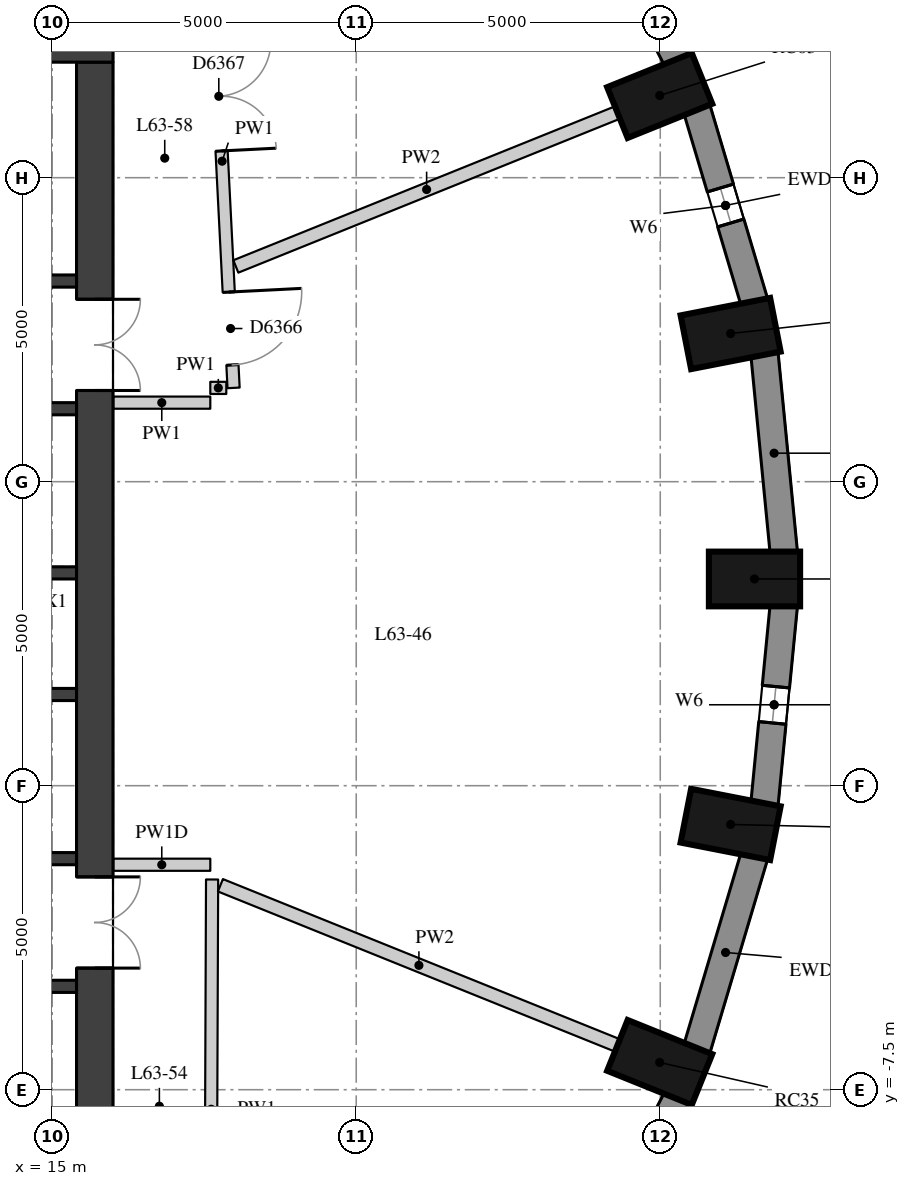
"""IFC4 building model, lengths in metres.
Left out: names, types, materials, properties, quantities, classifications, styles, units other than length and angle.
Written with IfcOpenShell. Run it as: python <this file> out.ifc"""

import sys

from ifc_helpers import new_model, si_unit, direction, frame, frame_2d, origin, origin_2d, place, context, subcontext, project, spatial, rectangle, extrude, element, fill, save


model = new_model("IFC4")
c1 = context("Model", 3, precision=1e-05, world=origin(), true_north=direction((0.0, 1.0)))
c2 = subcontext(c1, "Body", "Model", "MODEL_VIEW")
j1 = project(units=[si_unit("LENGTHUNIT", "METRE"), si_unit("PLANEANGLEUNIT", "RADIAN")], contexts=[c1])
p1 = place(None, origin())
s1 = spatial("IfcSite", under=j1, at=p1, CompositionType="ELEMENT")
p2 = place(p1, origin())
s2 = spatial("IfcBuilding", under=s1, at=p2, CompositionType="ELEMENT")
p3 = place(p2, frame((0.0, 0.0, 222.2)))
s3 = spatial("IfcBuildingStorey", under=s2, at=p3, CompositionType="ELEMENT", Elevation=222.2)
for number, where, z_axis, x_axis in (
    (1, (26.55, 0.9, 0.0), (0.0, 0.0, 1.0), (1.0, 0.0, 0.0)),
    (2, (26.157, 4.937, 0.0), (0.0, 0.0, 1.0), (0.981, 0.192, 0.0)),
    (3, (24.991, 8.852, 0.0), (0.0, 0.0, 1.0), (0.927, 0.374, 0.0)),
    (4, (24.991, -7.052, 0.0), (0.0, 0.0, 1.0), (0.927, -0.374, 0.0)),
    (5, (26.157, -3.137, 0.0), (0.0, 0.0, 1.0), (0.981, -0.192, 0.0)),
):
    element("IfcColumn", number, at=place(p3, frame(where, z_axis=z_axis, x_axis=x_axis)), inside=s3, PredefinedType="COLUMN", context=c2, shape_type="SweptSolid", body=[
        extrude(rectangle(XDim=1.5, YDim=0.9, at=origin_2d()), origin(), (0.0, 0.0, 1.0), 3.3),
    ])
p4 = place(p3, frame((27.032, 1.33, 0.0), z_axis=(0.0, 0.0, 1.0), x_axis=(-0.096824116835, 0.995301507283, 0.0)))
e6 = element("IfcWall", 6, at=p4, inside=s3, PredefinedType="SOLIDWALL", context=c2, shape_type="SweptSolid", body=[
    extrude(rectangle(XDim=3.293, YDim=0.45, at=frame_2d((1.646, 0.0))), origin(), (0.0, 0.0, 1.0), 3.02),
])
p5 = place(p3, frame((26.548, 5.452, 0.0), z_axis=(0.0, 0.0, 1.0), x_axis=(-0.285444972963, 0.958395099847, 0.0)))
e7 = element("IfcWall", 7, at=p5, inside=s3, PredefinedType="SOLIDWALL", context=c2, shape_type="SweptSolid", body=[
    extrude(rectangle(XDim=3.32, YDim=0.45, at=frame_2d((1.66, 0.0))), origin(), (0.0, 0.0, 1.0), 3.02),
])
p6 = place(p5, frame((1.36, 0.0, 0.4)))
e8 = element("IfcOpeningElement", 8, at=p6, cuts=e7, PredefinedType="OPENING", context=c2, shape_type="SweptSolid", body=[
    extrude(rectangle(XDim=0.6, YDim=1.75, at=frame_2d((0.3, 0.875))), frame((0.0, 0.235, 0.0), z_axis=(0.0, -1.0, 0.0), x_axis=(1.0, 0.0, 0.0)), (0.0, 0.0, 1.0), 0.47),
])
p7 = place(p3, frame((25.278, 9.432, 0.0), z_axis=(0.0, 0.0, 1.0), x_axis=(-0.460175500475, 0.887827972505, 0.0)))
e9 = element("IfcWall", 9, at=p7, inside=s3, PredefinedType="SOLIDWALL", context=c2, shape_type="SweptSolid", body=[
    extrude(rectangle(XDim=3.371, YDim=0.45, at=frame_2d((1.685, 0.0))), origin(), (0.0, 0.0, 1.0), 3.02),
])
p8 = place(p3, frame((23.727, -10.624, 0.0), z_axis=(0.0, 0.0, 1.0), x_axis=(0.460175500475, 0.887827972505, 0.0)))
e10 = element("IfcWall", 10, at=p8, inside=s3, PredefinedType="SOLIDWALL", context=c2, shape_type="SweptSolid", body=[
    extrude(rectangle(XDim=3.371, YDim=0.45, at=frame_2d((1.685, 0.0))), origin(), (0.0, 0.0, 1.0), 3.02),
])
p9 = place(p8, frame((1.385, 0.0, 0.4)))
e11 = element("IfcOpeningElement", 11, at=p9, cuts=e10, PredefinedType="OPENING", context=c2, shape_type="SweptSolid", body=[
    extrude(rectangle(XDim=0.6, YDim=1.75, at=frame_2d((0.3, 0.875))), frame((0.0, 0.235, 0.0), z_axis=(0.0, -1.0, 0.0), x_axis=(1.0, 0.0, 0.0)), (0.0, 0.0, 1.0), 0.47),
])
p10 = place(p3, frame((25.6, -6.834, 0.0), z_axis=(0.0, 0.0, 1.0), x_axis=(0.285444972963, 0.958395099847, 0.0)))
e12 = element("IfcWall", 12, at=p10, inside=s3, PredefinedType="SOLIDWALL", context=c2, shape_type="SweptSolid", body=[
    extrude(rectangle(XDim=3.32, YDim=0.45, at=frame_2d((1.66, 0.0))), origin(), (0.0, 0.0, 1.0), 3.02),
])
p11 = place(p3, frame((26.713, -2.808, 0.0), z_axis=(0.0, 0.0, 1.0), x_axis=(0.096816972749, 0.995302202242, 0.0)))
e13 = element("IfcWall", 13, at=p11, inside=s3, PredefinedType="SOLIDWALL", context=c2, shape_type="SweptSolid", body=[
    extrude(rectangle(XDim=3.293, YDim=0.45, at=frame_2d((1.646, 0.0))), origin(), (0.0, 0.0, 1.0), 3.02),
])
p12 = place(p11, frame((1.347, 0.0, 0.4)))
e14 = element("IfcOpeningElement", 14, at=p12, cuts=e13, PredefinedType="OPENING", context=c2, shape_type="SweptSolid", body=[
    extrude(rectangle(XDim=0.6, YDim=1.75, at=frame_2d((0.3, 0.875))), frame((0.0, 0.235, 0.0), z_axis=(0.0, -1.0, 0.0), x_axis=(1.0, 0.0, 0.0)), (0.0, 0.0, 1.0), 0.47),
])
p13 = place(p3, frame((15.7, -9.4, 0.0), z_axis=(0.0, 0.0, 1.0), x_axis=(0.0, 1.0, 0.0)))
e15 = element("IfcWall", 15, at=p13, inside=s3, PredefinedType="SHEAR", context=c2, shape_type="SweptSolid", body=[
    extrude(rectangle(XDim=18.8, YDim=0.6, at=frame_2d((9.4, 0.0))), origin(), (0.0, 0.0, 1.0), 3.02),
])
p14 = place(p13, frame((13.4, 0.0, 0.0)))
e16 = element("IfcOpeningElement", 16, at=p14, cuts=e15, PredefinedType="OPENING", context=c2, shape_type="SweptSolid", body=[
    extrude(rectangle(XDim=1.5, YDim=2.1, at=frame_2d((0.75, 1.05))), frame((0.0, 0.31, 0.0), z_axis=(0.0, -1.0, 0.0), x_axis=(1.0, 0.0, 0.0)), (0.0, 0.0, 1.0), 0.62),
])
p15 = place(p13, frame((3.9, 0.0, 0.0)))
e17 = element("IfcOpeningElement", 17, at=p15, cuts=e15, PredefinedType="OPENING", context=c2, shape_type="SweptSolid", body=[
    extrude(rectangle(XDim=1.5, YDim=2.1, at=frame_2d((0.75, 1.05))), frame((0.0, 0.31, 0.0), z_axis=(0.0, -1.0, 0.0), x_axis=(1.0, 0.0, 0.0)), (0.0, 0.0, 1.0), 0.62),
])
p16 = place(p3, frame((4.0, 9.7, 0.0), z_axis=(0.0, 0.0, 1.0), x_axis=(1.0, 0.0, 0.0)))
e18 = element("IfcWall", 18, at=p16, inside=s3, PredefinedType="SHEAR", context=c2, shape_type="SweptSolid", body=[
    extrude(rectangle(XDim=12.0, YDim=0.6, at=frame_2d((6.0, 0.0))), origin(), (0.0, 0.0, 1.0), 3.02),
])
p17 = place(p3, frame((4.6, 5.8, 0.0), z_axis=(0.0, 0.0, 1.0), x_axis=(1.0, 0.0, 0.0)))
e19 = element("IfcWall", 19, at=p17, inside=s3, PredefinedType="SHEAR", context=c2, shape_type="SweptSolid", body=[
    extrude(rectangle(XDim=10.8, YDim=0.2, at=frame_2d((5.4, 0.0))), origin(), (0.0, 0.0, 1.0), 3.02),
])
p18 = place(p17, frame((7.05, 0.0, 0.0)))
e20 = element("IfcOpeningElement", 20, at=p18, cuts=e19, PredefinedType="OPENING", context=c2, shape_type="SweptSolid", body=[
    extrude(rectangle(XDim=1.1, YDim=2.1, at=frame_2d((0.55, 1.05))), frame((0.0, 0.11, 0.0), z_axis=(0.0, -1.0, 0.0), x_axis=(1.0, 0.0, 0.0)), (0.0, 0.0, 1.0), 0.22),
])
p19 = place(p17, frame((9.05, 0.0, 0.0)))
e21 = element("IfcOpeningElement", 21, at=p19, cuts=e19, PredefinedType="OPENING", context=c2, shape_type="SweptSolid", body=[
    extrude(rectangle(XDim=1.1, YDim=2.1, at=frame_2d((0.55, 1.05))), frame((0.0, 0.11, 0.0), z_axis=(0.0, -1.0, 0.0), x_axis=(1.0, 0.0, 0.0)), (0.0, 0.0, 1.0), 0.22),
])
p20 = place(p3, frame((4.6, 3.7, 0.0), z_axis=(0.0, 0.0, 1.0), x_axis=(1.0, 0.0, 0.0)))
e22 = element("IfcWall", 22, at=p20, inside=s3, PredefinedType="SHEAR", context=c2, shape_type="SweptSolid", body=[
    extrude(rectangle(XDim=10.8, YDim=0.2, at=frame_2d((5.4, 0.0))), origin(), (0.0, 0.0, 1.0), 3.02),
])
p21 = place(p20, frame((6.6, 0.0, 0.0)))
e23 = element("IfcOpeningElement", 23, at=p21, cuts=e22, PredefinedType="OPENING", context=c2, shape_type="SweptSolid", body=[
    extrude(rectangle(XDim=1.1, YDim=2.1, at=frame_2d((0.55, 1.05))), frame((0.0, 0.11, 0.0), z_axis=(0.0, -1.0, 0.0), x_axis=(1.0, 0.0, 0.0)), (0.0, 0.0, 1.0), 0.22),
])
p22 = place(p20, frame((8.9, 0.0, 0.0)))
e24 = element("IfcOpeningElement", 24, at=p22, cuts=e22, PredefinedType="OPENING", context=c2, shape_type="SweptSolid", body=[
    extrude(rectangle(XDim=1.1, YDim=2.1, at=frame_2d((0.55, 1.05))), frame((0.0, 0.11, 0.0), z_axis=(0.0, -1.0, 0.0), x_axis=(1.0, 0.0, 0.0)), (0.0, 0.0, 1.0), 0.22),
])
for number, where, z_axis, x_axis in (
    (25, (4.6, 1.0, 0.0), (0.0, 0.0, 1.0), (1.0, 0.0, 0.0)),
    (26, (4.6, -1.0, 0.0), (0.0, 0.0, 1.0), (1.0, 0.0, 0.0)),
):
    element("IfcWall", number, at=place(p3, frame(where, z_axis=z_axis, x_axis=x_axis)), inside=s3, PredefinedType="SHEAR", context=c2, shape_type="SweptSolid", body=[
        extrude(rectangle(XDim=10.8, YDim=0.2, at=frame_2d((5.4, 0.0))), origin(), (0.0, 0.0, 1.0), 3.02),
    ])
p23 = place(p3, frame((4.6, -3.7, 0.0), z_axis=(0.0, 0.0, 1.0), x_axis=(1.0, 0.0, 0.0)))
e27 = element("IfcWall", 27, at=p23, inside=s3, PredefinedType="SHEAR", context=c2, shape_type="SweptSolid", body=[
    extrude(rectangle(XDim=10.8, YDim=0.2, at=frame_2d((5.4, 0.0))), origin(), (0.0, 0.0, 1.0), 3.02),
])
p24 = place(p23, frame((6.6, 0.0, 0.0)))
e28 = element("IfcOpeningElement", 28, at=p24, cuts=e27, PredefinedType="OPENING", context=c2, shape_type="SweptSolid", body=[
    extrude(rectangle(XDim=1.1, YDim=2.1, at=frame_2d((0.55, 1.05))), frame((0.0, 0.11, 0.0), z_axis=(0.0, -1.0, 0.0), x_axis=(1.0, 0.0, 0.0)), (0.0, 0.0, 1.0), 0.22),
])
p25 = place(p23, frame((8.9, 0.0, 0.0)))
e29 = element("IfcOpeningElement", 29, at=p25, cuts=e27, PredefinedType="OPENING", context=c2, shape_type="SweptSolid", body=[
    extrude(rectangle(XDim=1.1, YDim=2.1, at=frame_2d((0.55, 1.05))), frame((0.0, 0.11, 0.0), z_axis=(0.0, -1.0, 0.0), x_axis=(1.0, 0.0, 0.0)), (0.0, 0.0, 1.0), 0.22),
])
p26 = place(p3, frame((4.6, -5.8, 0.0), z_axis=(0.0, 0.0, 1.0), x_axis=(1.0, 0.0, 0.0)))
e30 = element("IfcWall", 30, at=p26, inside=s3, PredefinedType="SHEAR", context=c2, shape_type="SweptSolid", body=[
    extrude(rectangle(XDim=10.8, YDim=0.2, at=frame_2d((5.4, 0.0))), origin(), (0.0, 0.0, 1.0), 3.02),
])
p27 = place(p3, frame((17.63, -4.043, 0.0), z_axis=(0.0, 0.0, 1.0), x_axis=(-0.003908870153, -0.999992360338, 0.0)))
e31 = element("IfcWall", 31, at=p27, inside=s3, PredefinedType="PARTITIONING", context=c2, shape_type="SweptSolid", body=[
    extrude(rectangle(XDim=7.557, YDim=0.2, at=frame_2d((3.779, 0.0))), origin(), (0.0, 0.0, 1.0), 3.02),
])
p28 = place(p3, frame((17.605, 11.5, 0.0), z_axis=(0.0, 0.0, 1.0), x_axis=(0.050646981223, -0.998716618112, 0.0)))
e32 = element("IfcWall", 32, at=p28, inside=s3, PredefinedType="PARTITIONING", context=c2, shape_type="SweptSolid", body=[
    extrude(rectangle(XDim=7.467, YDim=0.2, at=frame_2d((3.733, 0.0))), origin(), (0.0, 0.0, 1.0), 3.02),
])
p29 = place(p28, frame((5.889, 0.0, 0.0)))
e33 = element("IfcOpeningElement", 33, at=p29, cuts=e32, PredefinedType="OPENING", context=c2, shape_type="SweptSolid", body=[
    extrude(rectangle(XDim=1.2, YDim=2.1, at=frame_2d((0.6, 1.05))), frame((0.0, 0.11, 0.0), z_axis=(0.0, -1.0, 0.0), x_axis=(1.0, 0.0, 0.0)), (0.0, 0.0, 1.0), 0.22),
])
p30 = place(p28, frame((1.765, 0.0, 0.0)))
e34 = element("IfcOpeningElement", 34, at=p30, cuts=e32, PredefinedType="OPENING", context=c2, shape_type="SweptSolid", body=[
    extrude(rectangle(XDim=1.8, YDim=2.1, at=frame_2d((0.9, 1.05))), frame((0.0, 0.11, 0.0), z_axis=(0.0, -1.0, 0.0), x_axis=(1.0, 0.0, 0.0)), (0.0, 0.0, 1.0), 0.22),
])
p31 = place(p3, frame((17.863, 4.043, 0.0), z_axis=(0.0, 0.0, 1.0), x_axis=(-1.0, 0.0, 0.0)))
e35 = element("IfcWall", 35, at=p31, inside=s3, PredefinedType="PARTITIONING", context=c2, shape_type="SweptSolid", body=[
    extrude(rectangle(XDim=0.263, YDim=0.2, at=frame_2d((0.131, 0.0))), origin(), (0.0, 0.0, 1.0), 3.02),
])
p32 = place(p3, frame((17.6, 3.8, 0.0), z_axis=(0.0, 0.0, 1.0), x_axis=(-1.0, 0.0, 0.0)))
e36 = element("IfcWall", 36, at=p32, inside=s3, PredefinedType="PARTITIONING", context=c2, shape_type="SweptSolid", body=[
    extrude(rectangle(XDim=1.596, YDim=0.2, at=frame_2d((0.798, 0.0))), origin(), (0.0, 0.0, 1.0), 3.02),
])
p33 = place(p3, frame((16.004, -3.8, 0.0), z_axis=(0.0, 0.0, 1.0), x_axis=(1.0, 0.0, 0.0)))
e37 = element("IfcWall", 37, at=p33, inside=s3, PredefinedType="PARTITIONING", context=c2, shape_type="SweptSolid", body=[
    extrude(rectangle(XDim=1.596, YDim=0.2, at=frame_2d((0.798, 0.0))), origin(), (0.0, 0.0, 1.0), 2.47),
])
p34 = place(p3, frame((24.295, 8.571, 0.0), z_axis=(0.0, 0.0, 1.0), x_axis=(-0.927397869515, -0.374076451569, 0.0)))
e38 = element("IfcWall", 38, at=p34, inside=s3, PredefinedType="PARTITIONING", context=c2, shape_type="SweptSolid", body=[
    extrude(rectangle(XDim=6.767, YDim=0.22, at=frame_2d((3.383, 0.0))), origin(), (0.0, 0.0, 1.0), 3.02),
])
p35 = place(p3, frame((24.295, -6.771, 0.0), z_axis=(0.0, 0.0, 1.0), x_axis=(-0.927386950843, 0.374103519639, 0.0)))
e39 = element("IfcWall", 39, at=p35, inside=s3, PredefinedType="PARTITIONING", context=c2, shape_type="SweptSolid", body=[
    extrude(rectangle(XDim=7.04, YDim=0.22, at=frame_2d((3.52, 0.0))), origin(), (0.0, 0.0, 1.0), 3.02),
])
p36 = place(p6, origin())
e40 = element("IfcWindow", 40, at=p36, inside=s3, PartitioningType="SINGLE_PANEL", PredefinedType="WINDOW", context=c2, shape_type="SweptSolid", body=[
    extrude(rectangle(XDim=0.6, YDim=1.75, at=frame_2d((0.3, 0.875))), frame((0.0, 0.035, 0.0), z_axis=(0.0, -1.0, 0.0), x_axis=(1.0, 0.0, 0.0)), (0.0, 0.0, 1.0), 0.06),
])
fill(e8, e40)
p37 = place(p12, origin())
e41 = element("IfcWindow", 41, at=p37, inside=s3, PartitioningType="SINGLE_PANEL", PredefinedType="WINDOW", context=c2, shape_type="SweptSolid", body=[
    extrude(rectangle(XDim=0.6, YDim=1.75, at=frame_2d((0.3, 0.875))), frame((0.0, 0.035, 0.0), z_axis=(0.0, -1.0, 0.0), x_axis=(1.0, 0.0, 0.0)), (0.0, 0.0, 1.0), 0.06),
])
fill(e14, e41)
p38 = place(p14, origin())
e42 = element("IfcDoor", 42, at=p38, inside=s3, OperationType="DOUBLE_DOOR_SINGLE_SWING", PredefinedType="DOOR", context=c2, shape_type="SweptSolid", body=[
    extrude(rectangle(XDim=1.5, YDim=2.1, at=frame_2d((0.75, 1.05))), frame((0.0, 0.025, 0.0), z_axis=(0.0, -1.0, 0.0), x_axis=(1.0, 0.0, 0.0)), (0.0, 0.0, 1.0), 0.05),
])
fill(e16, e42)
p39 = place(p15, origin())
e43 = element("IfcDoor", 43, at=p39, inside=s3, OperationType="DOUBLE_DOOR_SINGLE_SWING", PredefinedType="DOOR", context=c2, shape_type="SweptSolid", body=[
    extrude(rectangle(XDim=1.5, YDim=2.1, at=frame_2d((0.75, 1.05))), frame((0.0, 0.025, 0.0), z_axis=(0.0, -1.0, 0.0), x_axis=(1.0, 0.0, 0.0)), (0.0, 0.0, 1.0), 0.05),
])
fill(e17, e43)
p40 = place(p29, origin())
e44 = element("IfcDoor", 44, at=p40, inside=s3, OperationType="SINGLE_SWING_LEFT", PredefinedType="DOOR", context=c2, shape_type="SweptSolid", body=[
    extrude(rectangle(XDim=1.2, YDim=2.1, at=frame_2d((0.6, 1.05))), frame((0.0, 0.025, 0.0), z_axis=(0.0, -1.0, 0.0), x_axis=(1.0, 0.0, 0.0)), (0.0, 0.0, 1.0), 0.05),
])
fill(e33, e44)
p41 = place(p30, origin())
e45 = element("IfcDoor", 45, at=p41, inside=s3, OperationType="DOUBLE_DOOR_SINGLE_SWING", PredefinedType="DOOR", context=c2, shape_type="SweptSolid", body=[
    extrude(rectangle(XDim=1.8, YDim=2.1, at=frame_2d((0.9, 1.05))), frame((0.0, 0.025, 0.0), z_axis=(0.0, -1.0, 0.0), x_axis=(1.0, 0.0, 0.0)), (0.0, 0.0, 1.0), 0.05),
])
fill(e34, e45)
save(model, sys.argv[1])
